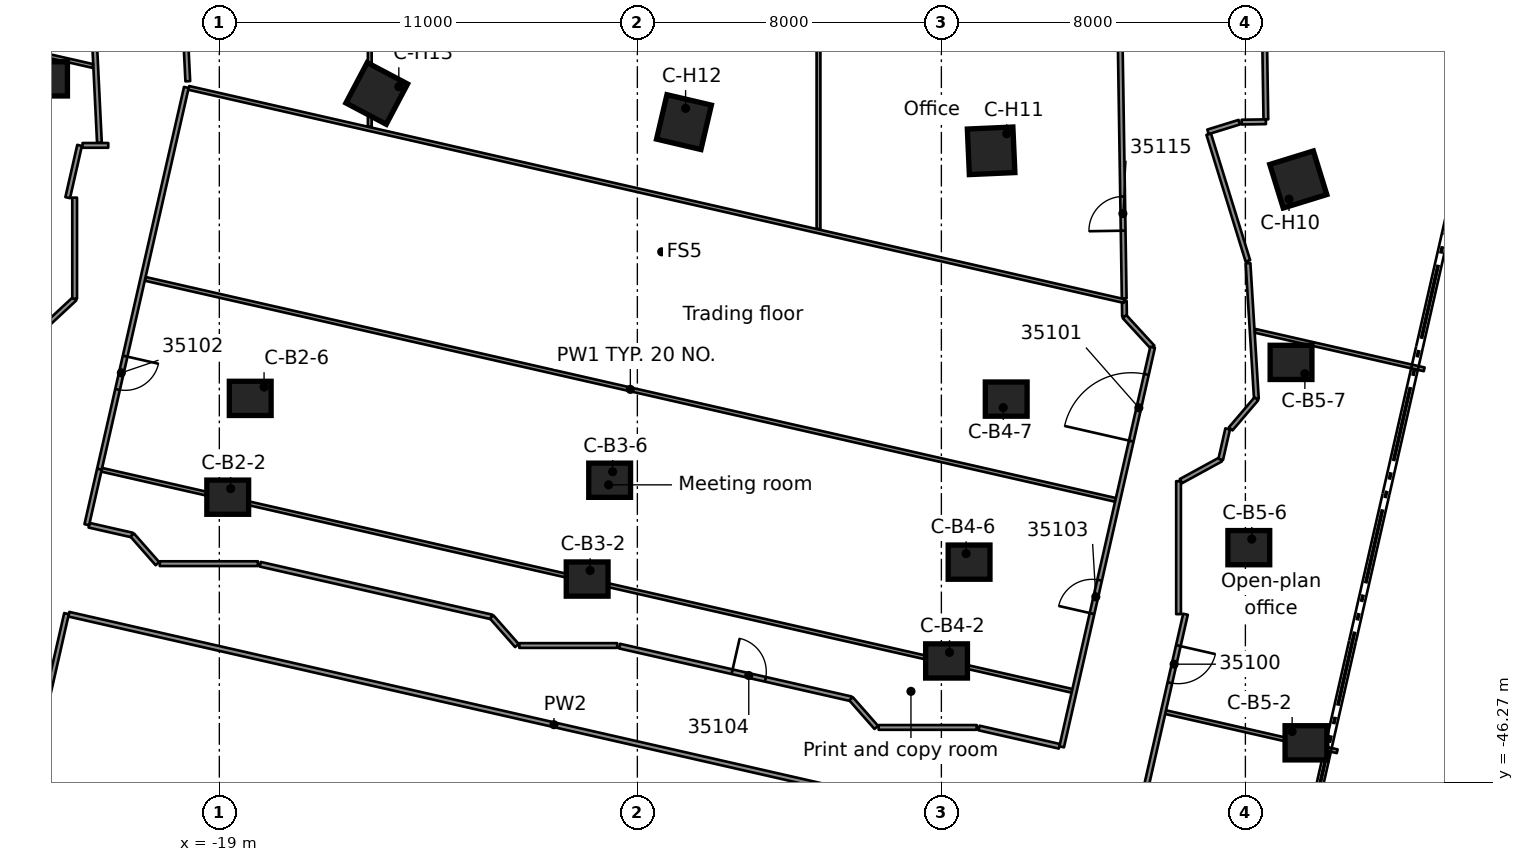
"""IFC4 building model, lengths in metres.
Left out: names, types, materials, properties, quantities, classifications, styles, units other than length and angle.
Written with IfcOpenShell. Run it as: python <this file> out.ifc"""

import sys

from ifc_helpers import new_model, si_unit, direction, frame, frame_2d, origin, origin_2d, place, context, subcontext, project, spatial, rectangle, extrude, element, fill, save


model = new_model("IFC4")
c1 = context("Model", 3, precision=1e-05, world=origin(), true_north=direction((0.0, 1.0)))
c2 = subcontext(c1, "Body", "Model", "MODEL_VIEW")
j1 = project(units=[si_unit("LENGTHUNIT", "METRE"), si_unit("PLANEANGLEUNIT", "RADIAN")], contexts=[c1])
p1 = place(None, origin())
s1 = spatial("IfcSite", under=j1, at=p1, CompositionType="ELEMENT")
p2 = place(p1, origin())
s2 = spatial("IfcBuilding", under=s1, at=p2, CompositionType="ELEMENT")
p3 = place(p2, frame((0.0, 0.0, 170.6)))
s3 = spatial("IfcBuildingStorey", under=s2, at=p3, CompositionType="ELEMENT", Elevation=170.6)
for number, where, z_axis, x_axis in (
    (1, (-23.547, -27.757, 0.0), (0.0, 0.0, 1.0), (1.0, 0.0, 0.0)),
    (2, (-18.779, -38.764, 0.0), (0.0, 0.0, 1.0), (1.0, 0.0, 0.0)),
    (3, (-18.187, -36.164, 0.0), (0.0, 0.0, 1.0), (1.0, 0.0, 0.0)),
    (4, (-9.321, -40.918, 0.0), (0.0, 0.0, 1.0), (1.0, 0.0, 0.0)),
    (5, (-8.729, -38.318, 0.0), (0.0, 0.0, 1.0), (1.0, 0.0, 0.0)),
    (6, (0.136, -43.073, 0.0), (0.0, 0.0, 1.0), (1.0, 0.0, 0.0)),
    (7, (0.729, -40.473, 0.0), (0.0, 0.0, 1.0), (1.0, 0.0, 0.0)),
    (8, (1.706, -36.183, 0.0), (0.0, 0.0, 1.0), (1.0, 0.0, 0.0)),
    (9, (9.594, -45.227, 0.0), (0.0, 0.0, 1.0), (1.0, 0.0, 0.0)),
    (10, (8.09, -40.092, 0.0), (0.0, 0.0, 1.0), (1.0, 0.0, 0.0)),
    (11, (9.201, -35.217, 0.0), (0.0, 0.0, 1.0), (1.0, 0.0, 0.0)),
):
    element("IfcColumn", number, at=place(p3, frame(where, z_axis=z_axis, x_axis=x_axis)), inside=s3, PredefinedType="COLUMN", context=c2, shape_type="SweptSolid", body=[
        extrude(rectangle(XDim=1.1, YDim=0.9, at=origin_2d()), origin(), (0.0, 0.0, 1.0), 3.5),
    ])
for number, where, z_axis, x_axis in (
    (12, (9.392, -30.405, 0.0), (0.0, 0.0, 1.0), (0.295, -0.955, 0.0)),
    (13, (1.309, -29.65, 0.0), (0.0, 0.0, 1.0), (0.044, -0.999, 0.0)),
    (14, (-6.774, -28.895, 0.0), (0.0, 0.0, 1.0), (-0.228, -0.974, 0.0)),
    (15, (-14.858, -28.141, 0.0), (0.0, 0.0, 1.0), (-0.467, -0.884, 0.0)),
):
    element("IfcColumn", number, at=place(p3, frame(where, z_axis=z_axis, x_axis=x_axis)), inside=s3, PredefinedType="COLUMN", context=c2, shape_type="SweptSolid", body=[
        extrude(rectangle(XDim=1.2, YDim=1.2, at=origin_2d()), origin(), (0.0, 0.0, 1.0), 3.5),
    ])
p4 = place(p3, frame((-3.234, -15.062, 0.0), z_axis=(0.0, 0.0, 1.0), x_axis=(5.8673394e-05, -0.999999998279, 0.0)))
e16 = element("IfcWall", 16, at=p4, inside=s3, PredefinedType="PARTITIONING", context=c2, shape_type="SweptSolid", body=[
    extrude(rectangle(XDim=16.644, YDim=0.1, at=frame_2d((8.322, 0.0))), origin(), (0.0, 0.0, 1.0), 3.06),
])
p5 = place(p3, frame((4.813, -33.602, 0.0), z_axis=(0.0, 0.0, 1.0), x_axis=(0.014888165056, -0.999889165128, 0.0)))
e17 = element("IfcWall", 17, at=p5, inside=s3, PredefinedType="PARTITIONING", context=c2, shape_type="SweptSolid", body=[
    extrude(rectangle(XDim=0.41, YDim=0.125, at=frame_2d((0.205, 0.0))), origin(), (0.0, 0.0, 1.0), 3.06),
])
p6 = place(p3, frame((4.811, -33.535, 0.0), z_axis=(0.0, 0.0, 1.0), x_axis=(-0.015646006357, 0.999877593751, 0.0)))
e18 = element("IfcWall", 18, at=p6, inside=s3, PredefinedType="PARTITIONING", context=c2, shape_type="SweptSolid", body=[
    extrude(rectangle(XDim=18.475, YDim=0.125, at=frame_2d((9.238, 0.0))), origin(), (0.0, 0.0, 1.0), 3.06),
])
p7 = place(p6, frame((1.783, 0.0, 0.0)))
e19 = element("IfcOpeningElement", 19, at=p7, cuts=e18, PredefinedType="OPENING", context=c2, shape_type="SweptSolid", body=[
    extrude(rectangle(XDim=0.9, YDim=2.1, at=frame_2d((0.45, 1.05))), frame((0.0, 0.073, 0.0), z_axis=(0.0, -1.0, 0.0), x_axis=(1.0, 0.0, 0.0)), (0.0, 0.0, 1.0), 0.145),
])
p8 = place(p3, frame((8.324, -15.062, 0.0), z_axis=(0.0, 0.0, 1.0), x_axis=(0.015628358081, -0.999877869754, 0.0)))
e20 = element("IfcWall", 20, at=p8, inside=s3, PredefinedType="PARTITIONING", context=c2, shape_type="SweptSolid", body=[
    extrude(rectangle(XDim=13.763, YDim=0.125, at=frame_2d((6.881, 0.0))), origin(), (0.0, 0.0, 1.0), 3.06),
])
p9 = place(p8, frame((1.038, 0.0, 0.0)))
e21 = element("IfcOpeningElement", 21, at=p9, cuts=e20, PredefinedType="OPENING", context=c2, shape_type="SweptSolid", body=[
    extrude(rectangle(XDim=0.9, YDim=2.1, at=frame_2d((0.45, 1.05))), frame((0.0, 0.073, 0.0), z_axis=(0.0, -1.0, 0.0), x_axis=(1.0, 0.0, 0.0)), (0.0, 0.0, 1.0), 0.145),
])
p10 = place(p3, frame((-22.322, -26.007, 0.0), z_axis=(0.0, 0.0, 1.0), x_axis=(0.048573949442, -0.998819589033, 0.0)))
e22 = element("IfcWall", 22, at=p10, inside=s3, PredefinedType="PARTITIONING", context=c2, shape_type="SweptSolid", body=[
    extrude(rectangle(XDim=3.438, YDim=0.125, at=frame_2d((1.719, 0.0))), origin(), (0.0, 0.0, 1.0), 3.06),
])
p11 = place(p3, frame((-19.956, -25.232, 0.0), z_axis=(0.0, 0.0, 1.0), x_axis=(0.048635402931, -0.998816598571, 0.0)))
e23 = element("IfcWall", 23, at=p11, inside=s3, PredefinedType="PARTITIONING", context=c2, shape_type="SweptSolid", body=[
    extrude(rectangle(XDim=2.59, YDim=0.125, at=frame_2d((1.295, 0.0))), origin(), (0.0, 0.0, 1.0), 3.06),
])
p12 = place(p3, frame((8.069, -32.609, 0.0), z_axis=(0.0, 0.0, 1.0), x_axis=(0.061565744527, -0.998103030303, 0.0)))
e24 = element("IfcWall", 24, at=p12, inside=s3, PredefinedType="PARTITIONING", context=c2, shape_type="SweptSolid", body=[
    extrude(rectangle(XDim=3.573, YDim=0.125, at=frame_2d((1.787, 0.0))), origin(), (0.0, 0.0, 1.0), 3.06),
])
p13 = place(p3, frame((7.034, -29.211, 0.0), z_axis=(0.0, 0.0, 1.0), x_axis=(0.295358504145, -0.955386494582, 0.0)))
e25 = element("IfcWall", 25, at=p13, inside=s3, PredefinedType="PARTITIONING", context=c2, shape_type="SweptSolid", body=[
    extrude(rectangle(XDim=3.491, YDim=0.125, at=frame_2d((1.745, 0.0))), origin(), (0.0, 0.0, 1.0), 3.06),
])
p14 = place(p3, frame((-22.961, -41.843, 0.0), z_axis=(0.0, 0.0, 1.0), x_axis=(0.975025683381, -0.222092135715, 0.0)))
e26 = element("IfcWall", 26, at=p14, inside=s3, PredefinedType="PARTITIONING", context=c2, shape_type="SweptSolid", body=[
    extrude(rectangle(XDim=26.187, YDim=0.125, at=frame_2d((13.094, 0.0))), origin(), (0.0, 0.0, 1.0), 3.06),
])
p15 = place(p3, frame((-22.427, -39.502, 0.0), z_axis=(0.0, 0.0, 1.0), x_axis=(0.97511430892, -0.221702694026, 0.0)))
e27 = element("IfcWall", 27, at=p15, inside=s3, PredefinedType="PARTITIONING", context=c2, shape_type="SweptSolid", body=[
    extrude(rectangle(XDim=1.164, YDim=0.125, at=frame_2d((0.582, 0.0))), origin(), (0.0, 0.0, 1.0), 3.06),
])
p16 = place(p3, frame((-17.924, -40.528, 0.0), z_axis=(0.0, 0.0, 1.0), x_axis=(0.975041788435, -0.2220214197, 0.0)))
e28 = element("IfcWall", 28, at=p16, inside=s3, PredefinedType="PARTITIONING", context=c2, shape_type="SweptSolid", body=[
    extrude(rectangle(XDim=6.247, YDim=0.125, at=frame_2d((3.124, 0.0))), origin(), (0.0, 0.0, 1.0), 3.06),
])
p17 = place(p3, frame((-8.469, -42.682, 0.0), z_axis=(0.0, 0.0, 1.0), x_axis=(0.975048737106, -0.22199090132, 0.0)))
e29 = element("IfcWall", 29, at=p17, inside=s3, PredefinedType="PARTITIONING", context=c2, shape_type="SweptSolid", body=[
    extrude(rectangle(XDim=6.249, YDim=0.125, at=frame_2d((3.125, 0.0))), origin(), (0.0, 0.0, 1.0), 3.06),
])
p18 = place(p17, frame((3.038, 0.0, 0.0)))
e30 = element("IfcOpeningElement", 30, at=p18, cuts=e29, PredefinedType="OPENING", context=c2, shape_type="SweptSolid", body=[
    extrude(rectangle(XDim=0.9, YDim=2.1, at=frame_2d((0.45, 1.05))), frame((0.0, 0.073, 0.0), z_axis=(0.0, -1.0, 0.0), x_axis=(1.0, 0.0, 0.0)), (0.0, 0.0, 1.0), 0.145),
])
p19 = place(p3, frame((0.991, -44.837, 0.0), z_axis=(0.0, 0.0, 1.0), x_axis=(0.97505868901, -0.22194718513, 0.0)))
e31 = element("IfcWall", 31, at=p19, inside=s3, PredefinedType="PARTITIONING", context=c2, shape_type="SweptSolid", body=[
    extrude(rectangle(XDim=2.168, YDim=0.125, at=frame_2d((1.084, 0.0))), origin(), (0.0, 0.0, 1.0), 3.06),
])
p20 = place(p3, frame((-22.095, -38.043, 0.0), z_axis=(0.0, 0.0, 1.0), x_axis=(0.975023843859, -0.222100211404, 0.0)))
e32 = element("IfcWall", 32, at=p20, inside=s3, PredefinedType="PARTITIONING", context=c2, shape_type="SweptSolid", body=[
    extrude(rectangle(XDim=26.186, YDim=0.1, at=frame_2d((13.093, 0.0))), origin(), (0.0, 0.0, 1.0), 3.06),
])
p21 = place(p3, frame((5.9, -44.42, 0.0), z_axis=(0.0, 0.0, 1.0), x_axis=(0.975008438008, -0.222167832534, 0.0)))
e33 = element("IfcWall", 33, at=p21, inside=s3, PredefinedType="PARTITIONING", context=c2, shape_type="SweptSolid", body=[
    extrude(rectangle(XDim=4.632, YDim=0.1, at=frame_2d((2.316, 0.0))), origin(), (0.0, 0.0, 1.0), 3.06),
])
p22 = place(p3, frame((-20.951, -33.019, 0.0), z_axis=(0.0, 0.0, 1.0), x_axis=(0.975025683381, -0.222092135715, 0.0)))
e34 = element("IfcWall", 34, at=p22, inside=s3, PredefinedType="PARTITIONING", context=c2, shape_type="SweptSolid", body=[
    extrude(rectangle(XDim=26.187, YDim=0.1, at=frame_2d((13.094, 0.0))), origin(), (0.0, 0.0, 1.0), 3.06),
])
p23 = place(p3, frame((-26.784, -26.404, 0.0), z_axis=(0.0, 0.0, 1.0), x_axis=(0.975064044209, -0.221923657346, 0.0)))
e35 = element("IfcWall", 35, at=p23, inside=s3, PredefinedType="PARTITIONING", context=c2, shape_type="SweptSolid", body=[
    extrude(rectangle(XDim=4.569, YDim=0.1, at=frame_2d((2.284, 0.0))), origin(), (0.0, 0.0, 1.0), 3.06),
])
p24 = place(p3, frame((-19.806, -27.994, 0.0), z_axis=(0.0, 0.0, 1.0), x_axis=(0.975005878079, -0.222179066769, 0.0)))
e36 = element("IfcWall", 36, at=p24, inside=s3, PredefinedType="PARTITIONING", context=c2, shape_type="SweptSolid", body=[
    extrude(rectangle(XDim=25.246, YDim=0.1, at=frame_2d((12.623, 0.0))), origin(), (0.0, 0.0, 1.0), 3.06),
])
p25 = place(p3, frame((8.256, -34.387, 0.0), z_axis=(0.0, 0.0, 1.0), x_axis=(0.975047109618, -0.221998049597, 0.0)))
e37 = element("IfcWall", 37, at=p25, inside=s3, PredefinedType="PARTITIONING", context=c2, shape_type="SweptSolid", body=[
    extrude(rectangle(XDim=4.563, YDim=0.1, at=frame_2d((2.281, 0.0))), origin(), (0.0, 0.0, 1.0), 3.06),
])
p26 = place(p3, frame((-1.651, -44.822, 0.0), z_axis=(0.0, 0.0, 1.0), x_axis=(1.0, 0.0, 0.0)))
e38 = element("IfcWall", 38, at=p26, inside=s3, PredefinedType="PARTITIONING", context=c2, shape_type="SweptSolid", body=[
    extrude(rectangle(XDim=2.581, YDim=0.125, at=frame_2d((1.291, 0.0))), origin(), (0.0, 0.0, 1.0), 3.06),
])
p27 = place(p3, frame((-11.107, -42.667, 0.0), z_axis=(0.0, 0.0, 1.0), x_axis=(1.0, 0.0, 0.0)))
e39 = element("IfcWall", 39, at=p27, inside=s3, PredefinedType="PARTITIONING", context=c2, shape_type="SweptSolid", body=[
    extrude(rectangle(XDim=2.577, YDim=0.125, at=frame_2d((1.289, 0.0))), origin(), (0.0, 0.0, 1.0), 3.06),
])
p28 = place(p3, frame((-20.567, -40.513, 0.0), z_axis=(0.0, 0.0, 1.0), x_axis=(1.0, 0.0, 0.0)))
e40 = element("IfcWall", 40, at=p28, inside=s3, PredefinedType="PARTITIONING", context=c2, shape_type="SweptSolid", body=[
    extrude(rectangle(XDim=2.582, YDim=0.125, at=frame_2d((1.291, 0.0))), origin(), (0.0, 0.0, 1.0), 3.06),
])
p29 = place(p3, frame((6.303, -38.342, 0.0), z_axis=(0.0, 0.0, 1.0), x_axis=(0.877434318746, 0.479696796202, 0.0)))
e41 = element("IfcWall", 41, at=p29, inside=s3, PredefinedType="PARTITIONING", context=c2, shape_type="SweptSolid", body=[
    extrude(rectangle(XDim=1.195, YDim=0.125, at=frame_2d((0.597, 0.0))), origin(), (0.0, 0.0, 1.0), 3.06),
])
p30 = place(p3, frame((-23.709, -34.381, 0.0), z_axis=(0.0, 0.0, 1.0), x_axis=(0.732207421562, 0.681081707147, 0.0)))
e42 = element("IfcWall", 42, at=p30, inside=s3, PredefinedType="PARTITIONING", context=c2, shape_type="SweptSolid", body=[
    extrude(rectangle(XDim=1.232, YDim=0.125, at=frame_2d((0.616, 0.0))), origin(), (0.0, 0.0, 1.0), 3.06),
])
p31 = place(p3, frame((-22.599, -29.507, 0.0), z_axis=(0.0, 0.0, 1.0), x_axis=(1.0, 0.0, 0.0)))
e43 = element("IfcWall", 43, at=p31, inside=s3, PredefinedType="PARTITIONING", context=c2, shape_type="SweptSolid", body=[
    extrude(rectangle(XDim=0.676, YDim=0.125, at=frame_2d((0.338, 0.0))), origin(), (0.0, 0.0, 1.0), 3.06),
])
p32 = place(p3, frame((7.613, -36.966, 0.0), z_axis=(0.0, 0.0, 1.0), x_axis=(0.649689309886, 0.760199842554, 0.0)))
e44 = element("IfcWall", 44, at=p32, inside=s3, PredefinedType="PARTITIONING", context=c2, shape_type="SweptSolid", body=[
    extrude(rectangle(XDim=1.041, YDim=0.125, at=frame_2d((0.52, 0.0))), origin(), (0.0, 0.0, 1.0), 3.06),
])
p33 = place(p3, frame((7.902, -28.895, 0.0), z_axis=(0.0, 0.0, 1.0), x_axis=(0.999876922486, 0.015688845703, 0.0)))
e45 = element("IfcWall", 45, at=p33, inside=s3, PredefinedType="PARTITIONING", context=c2, shape_type="SweptSolid", body=[
    extrude(rectangle(XDim=0.638, YDim=0.125, at=frame_2d((0.319, 0.0))), origin(), (0.0, 0.0, 1.0), 3.06),
])
p34 = place(p3, frame((4.82, -34.013, 0.0), z_axis=(0.0, 0.0, 1.0), x_axis=(0.676189811414, -0.736727452278, 0.0)))
e46 = element("IfcWall", 46, at=p34, inside=s3, PredefinedType="PARTITIONING", context=c2, shape_type="SweptSolid", body=[
    extrude(rectangle(XDim=1.093, YDim=0.125, at=frame_2d((0.546, 0.0))), origin(), (0.0, 0.0, 1.0), 3.06),
])
p35 = place(p3, frame((7.016, -29.151, 0.0), z_axis=(0.0, 0.0, 1.0), x_axis=(0.955337275677, 0.295517663943, 0.0)))
e47 = element("IfcWall", 47, at=p35, inside=s3, PredefinedType="PARTITIONING", context=c2, shape_type="SweptSolid", body=[
    extrude(rectangle(XDim=0.863, YDim=0.125, at=frame_2d((0.431, 0.0))), origin(), (0.0, 0.0, 1.0), 3.06),
])
p36 = place(p3, frame((6.424, -41.844, 0.0), z_axis=(0.0, 0.0, 1.0), x_axis=(-0.222230368286, -0.974994186348, 0.0)))
e48 = element("IfcWall", 48, at=p36, inside=s3, PredefinedType="PARTITIONING", context=c2, shape_type="SweptSolid", body=[
    extrude(rectangle(XDim=15.569, YDim=0.125, at=frame_2d((7.785, 0.0))), origin(), (0.0, 0.0, 1.0), 3.06),
])
p37 = place(p36, frame((0.848, 0.0, 0.0)))
e49 = element("IfcOpeningElement", 49, at=p37, cuts=e48, PredefinedType="OPENING", context=c2, shape_type="SweptSolid", body=[
    extrude(rectangle(XDim=1.0, YDim=2.1, at=frame_2d((0.5, 1.05))), frame((0.0, 0.073, 0.0), z_axis=(0.0, -1.0, 0.0), x_axis=(1.0, 0.0, 0.0)), (0.0, 0.0, 1.0), 0.145),
])
p38 = place(p36, frame((13.077, 0.0, 0.0)))
e50 = element("IfcOpeningElement", 50, at=p38, cuts=e48, PredefinedType="OPENING", context=c2, shape_type="SweptSolid", body=[
    extrude(rectangle(XDim=0.9, YDim=2.1, at=frame_2d((0.45, 1.05))), frame((0.0, 0.073, 0.0), z_axis=(0.0, -1.0, 0.0), x_axis=(1.0, 0.0, 0.0)), (0.0, 0.0, 1.0), 0.145),
])
p39 = place(p3, frame((7.351, -37.769, 0.0), z_axis=(0.0, 0.0, 1.0), x_axis=(0.222043922605, 0.975036664149, 0.0)))
e51 = element("IfcWall", 51, at=p39, inside=s3, PredefinedType="PARTITIONING", context=c2, shape_type="SweptSolid", body=[
    extrude(rectangle(XDim=0.823, YDim=0.125, at=frame_2d((0.412, 0.0))), origin(), (0.0, 0.0, 1.0), 3.06),
])
p40 = place(p3, frame((3.166, -45.332, 0.0), z_axis=(0.0, 0.0, 1.0), x_axis=(0.221933270953, 0.975061856112, 0.0)))
e52 = element("IfcWall", 52, at=p40, inside=s3, PredefinedType="PARTITIONING", context=c2, shape_type="SweptSolid", body=[
    extrude(rectangle(XDim=10.783, YDim=0.125, at=frame_2d((5.391, 0.0))), origin(), (0.0, 0.0, 1.0), 3.06),
])
p41 = place(p40, frame((8.249, 0.0, 0.0)))
e53 = element("IfcOpeningElement", 53, at=p41, cuts=e52, PredefinedType="OPENING", context=c2, shape_type="SweptSolid", body=[
    extrude(rectangle(XDim=1.8, YDim=2.1, at=frame_2d((0.9, 1.05))), frame((0.0, 0.073, 0.0), z_axis=(0.0, -1.0, 0.0), x_axis=(1.0, 0.0, 0.0)), (0.0, 0.0, 1.0), 0.145),
])
p42 = place(p40, frame((3.596, 0.0, 0.0)))
e54 = element("IfcOpeningElement", 54, at=p42, cuts=e52, PredefinedType="OPENING", context=c2, shape_type="SweptSolid", body=[
    extrude(rectangle(XDim=0.9, YDim=2.1, at=frame_2d((0.45, 1.05))), frame((0.0, 0.073, 0.0), z_axis=(0.0, -1.0, 0.0), x_axis=(1.0, 0.0, 0.0)), (0.0, 0.0, 1.0), 0.145),
])
p43 = place(p3, frame((-24.777, -49.534, 0.0), z_axis=(0.0, 0.0, 1.0), x_axis=(0.222163061165, 0.975009525212, 0.0)))
e55 = element("IfcWall", 55, at=p43, inside=s3, PredefinedType="PARTITIONING", context=c2, shape_type="SweptSolid", body=[
    extrude(rectangle(XDim=7.905, YDim=0.125, at=frame_2d((3.952, 0.0))), origin(), (0.0, 0.0, 1.0), 3.06),
])
p44 = place(p3, frame((-19.868, -27.982, 0.0), z_axis=(0.0, 0.0, 1.0), x_axis=(-0.222050161604, -0.975035243328, 0.0)))
e56 = element("IfcWall", 56, at=p44, inside=s3, PredefinedType="PARTITIONING", context=c2, shape_type="SweptSolid", body=[
    extrude(rectangle(XDim=10.304, YDim=0.125, at=frame_2d((5.152, 0.0))), origin(), (0.0, 0.0, 1.0), 3.06),
])
p45 = place(p44, frame((7.252, 0.0, 0.0)))
e57 = element("IfcOpeningElement", 57, at=p45, cuts=e56, PredefinedType="OPENING", context=c2, shape_type="SweptSolid", body=[
    extrude(rectangle(XDim=0.9, YDim=2.1, at=frame_2d((0.45, 1.05))), frame((0.0, 0.073, 0.0), z_axis=(0.0, -1.0, 0.0), x_axis=(1.0, 0.0, 0.0)), (0.0, 0.0, 1.0), 0.145),
])
p46 = place(p3, frame((-22.488, -39.488, 0.0), z_axis=(0.0, 0.0, 1.0), x_axis=(0.221903185503, 0.975068703356, 0.0)))
e58 = element("IfcWall", 58, at=p46, inside=s3, PredefinedType="PARTITIONING", context=c2, shape_type="SweptSolid", body=[
    extrude(rectangle(XDim=1.496, YDim=0.125, at=frame_2d((0.748, 0.0))), origin(), (0.0, 0.0, 1.0), 3.06),
])
p47 = place(p3, frame((-22.99, -30.882, 0.0), z_axis=(0.0, 0.0, 1.0), x_axis=(0.221950340639, 0.975057970733, 0.0)))
e59 = element("IfcWall", 59, at=p47, inside=s3, PredefinedType="PARTITIONING", context=c2, shape_type="SweptSolid", body=[
    extrude(rectangle(XDim=1.41, YDim=0.125, at=frame_2d((0.705, 0.0))), origin(), (0.0, 0.0, 1.0), 3.06),
])
p48 = place(p3, frame((6.241, -41.841, 0.0), z_axis=(0.0, 0.0, 1.0), x_axis=(0.0, 1.0, 0.0)))
e60 = element("IfcWall", 60, at=p48, inside=s3, PredefinedType="PARTITIONING", context=c2, shape_type="SweptSolid", body=[
    extrude(rectangle(XDim=3.499, YDim=0.125, at=frame_2d((1.75, 0.0))), origin(), (0.0, 0.0, 1.0), 3.06),
])
p49 = place(p3, frame((-1.713, -44.822, 0.0), z_axis=(0.0, 0.0, 1.0), x_axis=(-0.660913097692, 0.750462442298, 0.0)))
e61 = element("IfcWall", 61, at=p49, inside=s3, PredefinedType="PARTITIONING", context=c2, shape_type="SweptSolid", body=[
    extrude(rectangle(XDim=1.003, YDim=0.125, at=frame_2d((0.501, 0.0))), origin(), (0.0, 0.0, 1.0), 3.06),
])
p50 = place(p3, frame((-11.17, -42.667, 0.0), z_axis=(0.0, 0.0, 1.0), x_axis=(-0.66139609203, 0.750036805395, 0.0)))
e62 = element("IfcWall", 62, at=p50, inside=s3, PredefinedType="PARTITIONING", context=c2, shape_type="SweptSolid", body=[
    extrude(rectangle(XDim=1.002, YDim=0.125, at=frame_2d((0.501, 0.0))), origin(), (0.0, 0.0, 1.0), 3.06),
])
p51 = place(p3, frame((-15.041, -29.016, 0.0), z_axis=(0.0, 0.0, 1.0), x_axis=(0.0, 1.0, 0.0)))
e63 = element("IfcWall", 63, at=p51, inside=s3, PredefinedType="PARTITIONING", context=c2, shape_type="SweptSolid", body=[
    extrude(rectangle(XDim=13.902, YDim=0.1, at=frame_2d((6.951, 0.0))), origin(), (0.0, 0.0, 1.0), 3.06),
])
p52 = place(p3, frame((-20.629, -40.513, 0.0), z_axis=(0.0, 0.0, 1.0), x_axis=(-0.660913097692, 0.750462442298, 0.0)))
e64 = element("IfcWall", 64, at=p52, inside=s3, PredefinedType="PARTITIONING", context=c2, shape_type="SweptSolid", body=[
    extrude(rectangle(XDim=1.003, YDim=0.125, at=frame_2d((0.501, 0.0))), origin(), (0.0, 0.0, 1.0), 3.06),
])
p53 = place(p3, frame((-22.807, -33.542, 0.0), z_axis=(0.0, 0.0, 1.0), x_axis=(0.0, 1.0, 0.0)))
e65 = element("IfcWall", 65, at=p53, inside=s3, PredefinedType="PARTITIONING", context=c2, shape_type="SweptSolid", body=[
    extrude(rectangle(XDim=2.66, YDim=0.125, at=frame_2d((1.33, 0.0))), origin(), (0.0, 0.0, 1.0), 3.06),
])
p54 = place(p37, origin())
e66 = element("IfcDoor", 66, at=p54, inside=s3, OperationType="SINGLE_SWING_LEFT", PredefinedType="DOOR", context=c2, shape_type="SweptSolid", body=[
    extrude(rectangle(XDim=1.0, YDim=2.1, at=frame_2d((0.5, 1.05))), frame((0.0, 0.025, 0.0), z_axis=(0.0, -1.0, 0.0), x_axis=(1.0, 0.0, 0.0)), (0.0, 0.0, 1.0), 0.05),
])
fill(e49, e66)
p55 = place(p41, origin())
e67 = element("IfcDoor", 67, at=p55, inside=s3, OperationType="DOUBLE_DOOR_SINGLE_SWING", PredefinedType="DOOR", context=c2, shape_type="SweptSolid", body=[
    extrude(rectangle(XDim=1.8, YDim=2.1, at=frame_2d((0.9, 1.05))), frame((0.0, 0.025, 0.0), z_axis=(0.0, -1.0, 0.0), x_axis=(1.0, 0.0, 0.0)), (0.0, 0.0, 1.0), 0.05),
])
fill(e53, e67)
p56 = place(p45, origin())
e68 = element("IfcDoor", 68, at=p56, inside=s3, OperationType="SINGLE_SWING_RIGHT", PredefinedType="DOOR", context=c2, shape_type="SweptSolid", body=[
    extrude(rectangle(XDim=0.9, YDim=2.1, at=frame_2d((0.45, 1.05))), frame((0.0, 0.025, 0.0), z_axis=(0.0, -1.0, 0.0), x_axis=(1.0, 0.0, 0.0)), (0.0, 0.0, 1.0), 0.05),
])
fill(e57, e68)
p57 = place(p42, origin())
e69 = element("IfcDoor", 69, at=p57, inside=s3, OperationType="SINGLE_SWING_LEFT", PredefinedType="DOOR", context=c2, shape_type="SweptSolid", body=[
    extrude(rectangle(XDim=0.9, YDim=2.1, at=frame_2d((0.45, 1.05))), frame((0.0, 0.025, 0.0), z_axis=(0.0, -1.0, 0.0), x_axis=(1.0, 0.0, 0.0)), (0.0, 0.0, 1.0), 0.05),
])
fill(e54, e69)
p58 = place(p18, origin())
e70 = element("IfcDoor", 70, at=p58, inside=s3, OperationType="SINGLE_SWING_RIGHT", PredefinedType="DOOR", context=c2, shape_type="SweptSolid", body=[
    extrude(rectangle(XDim=0.9, YDim=2.1, at=frame_2d((0.45, 1.05))), frame((0.0, 0.025, 0.0), z_axis=(0.0, -1.0, 0.0), x_axis=(1.0, 0.0, 0.0)), (0.0, 0.0, 1.0), 0.05),
])
fill(e30, e70)
p59 = place(p7, origin())
e71 = element("IfcDoor", 71, at=p59, inside=s3, OperationType="SINGLE_SWING_LEFT", PredefinedType="DOOR", context=c2, shape_type="SweptSolid", body=[
    extrude(rectangle(XDim=0.9, YDim=2.1, at=frame_2d((0.45, 1.05))), frame((0.0, 0.025, 0.0), z_axis=(0.0, -1.0, 0.0), x_axis=(1.0, 0.0, 0.0)), (0.0, 0.0, 1.0), 0.05),
])
fill(e19, e71)
save(model, sys.argv[1])
